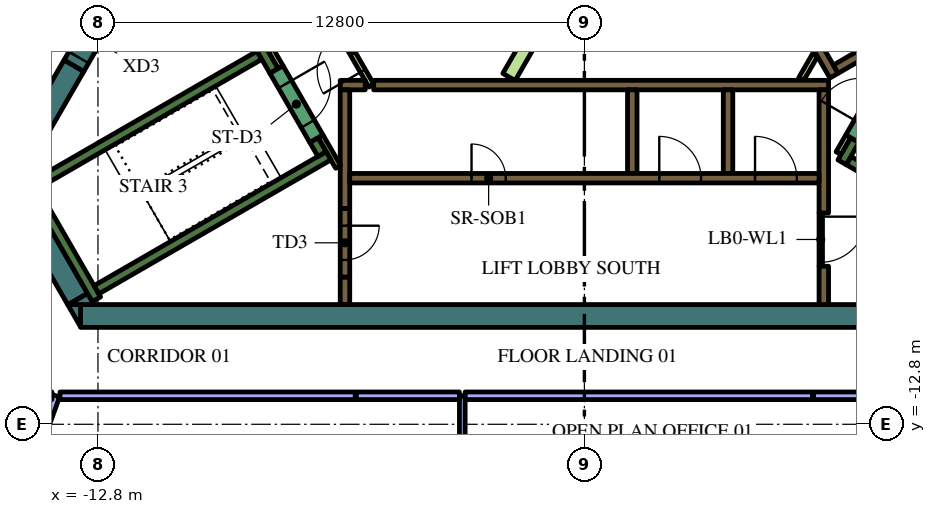
"""IFC4 building model, lengths in metres.
Left out: names, types, materials, properties, quantities, classifications, styles, units other than length and angle.
Written with IfcOpenShell. Run it as: python <this file> out.ifc"""

import sys

from ifc_helpers import new_model, si_unit, direction, frame, frame_2d, origin, place, context, subcontext, project, spatial, polyline, rectangle, outline, extrude, element, fill, save


model = new_model("IFC4")
c1 = context("Model", 3, precision=1e-05, world=origin(), true_north=direction((0.0, 1.0)))
c2 = subcontext(c1, "Body", "Model", "MODEL_VIEW")
j1 = project(units=[si_unit("LENGTHUNIT", "METRE"), si_unit("PLANEANGLEUNIT", "RADIAN")], contexts=[c1])
p1 = place(None, origin())
s1 = spatial("IfcSite", under=j1, at=p1, CompositionType="ELEMENT")
p2 = place(p1, origin())
s2 = spatial("IfcBuilding", under=s1, at=p2, CompositionType="ELEMENT")
p3 = place(p2, frame((0.0, 0.0, 267.0)))
s3 = spatial("IfcBuildingStorey", under=s2, at=p3, CompositionType="ELEMENT", Elevation=267.0)
p4 = place(p3, frame((8.904, -9.95, 0.0), z_axis=(0.0, 0.0, 1.0), x_axis=(-1.0, 0.0, 0.0)))
e1 = element("IfcWall", 1, at=p4, inside=s3, PredefinedType="SOLIDWALL", context=c2, shape_type="SweptSolid", body=[
    extrude(rectangle(XDim=22.161, YDim=0.6, at=frame_2d((11.081, 0.0))), origin(), (0.0, 0.0, 1.0), 4.2),
])
p5 = place(p3, origin())
e2 = element("IfcWall", 2, at=p5, inside=s3, PredefinedType="SOLIDWALL", context=c2, shape_type="SweptSolid", body=[
    extrude(outline(polyline([(-13.597, -9.65), (-13.259, -9.65), (-13.259, -10.236), (-13.597, -9.65)])), origin(), (0.0, 0.0, 1.0), 4.2),
])
p6 = place(p3, frame((-13.333, -9.506, 0.0), z_axis=(0.0, 0.0, 1.0), x_axis=(-0.500019073792, 0.866014391245, 0.0)))
e3 = element("IfcWall", 3, at=p6, inside=s3, PredefinedType="SOLIDWALL", context=c2, shape_type="SweptSolid", body=[
    extrude(rectangle(XDim=3.823, YDim=0.6, at=frame_2d((1.912, 0.0))), origin(), (0.0, 0.0, 1.0), 4.2),
])
e4 = element("IfcWall", 4, at=p5, inside=s3, PredefinedType="SOLIDWALL", context=c2, shape_type="SweptSolid", body=[
    extrude(outline(polyline([(-12.904, -9.65), (-13.58, -9.65), (-13.073, -9.357), (-12.904, -9.65)])), origin(), (0.0, 0.0, 1.0), 4.2),
])
p7 = place(p3, frame((-13.432, -3.364, 0.0), z_axis=(0.0, 0.0, 1.0), x_axis=(-0.499960127962, -0.866048422692, 0.0)))
e5 = element("IfcWall", 5, at=p7, inside=s3, PredefinedType="SOLIDWALL", context=c2, shape_type="SweptSolid", body=[
    extrude(rectangle(XDim=2.934, YDim=0.6, at=frame_2d((1.467, 0.0))), origin(), (0.0, 0.0, 1.0), 4.2),
])
p8 = place(p3, frame((12.84, -9.261, 0.0), z_axis=(0.0, 0.0, 1.0), x_axis=(-0.866013990052, 0.500019768644, 0.0)))
e6 = element("IfcWall", 6, at=p8, inside=s3, PredefinedType="SOLIDWALL", context=c2, shape_type="SweptSolid", body=[
    extrude(rectangle(XDim=6.8, YDim=0.25, at=frame_2d((3.4, 0.0))), origin(), (0.0, 0.0, 1.0), 4.2),
])
p9 = place(p3, frame((6.78, -5.906, 0.0), z_axis=(0.0, 0.0, 1.0), x_axis=(0.500223362819, 0.865896406789, 0.0)))
e7 = element("IfcWall", 7, at=p9, inside=s3, PredefinedType="SOLIDWALL", context=c2, shape_type="SweptSolid", body=[
    extrude(rectangle(XDim=0.675, YDim=0.25, at=frame_2d((0.337, 0.0))), origin(), (0.0, 0.0, 1.0), 4.2),
])
p10 = place(p3, frame((-12.84, -9.511, 0.0), z_axis=(0.0, 0.0, 1.0), x_axis=(-0.499997733992, 0.866026712061, 0.0)))
e8 = element("IfcWall", 8, at=p10, inside=s3, PredefinedType="SOLIDWALL", context=c2, shape_type="SweptSolid", body=[
    extrude(rectangle(XDim=3.634, YDim=0.25, at=frame_2d((1.817, 0.0))), origin(), (0.0, 0.0, 1.0), 4.2),
])
p11 = place(p3, frame((-14.44, -6.49, 0.0), z_axis=(0.0, 0.0, 1.0), x_axis=(0.866022966069, 0.500004222222, 0.0)))
e9 = element("IfcWall", 9, at=p11, inside=s3, PredefinedType="SOLIDWALL", context=c2, shape_type="SweptSolid", body=[
    extrude(rectangle(XDim=6.8, YDim=0.25, at=frame_2d((3.4, 0.0))), origin(), (0.0, 0.0, 1.0), 4.2),
])
p12 = place(p3, frame((-8.168, -3.503, 0.0), z_axis=(0.0, 0.0, 1.0), x_axis=(-0.499952099219, 0.866053057547, 0.0)))
e10 = element("IfcWall", 10, at=p12, inside=s3, PredefinedType="SOLIDWALL", context=c2, shape_type="SweptSolid", body=[
    extrude(rectangle(XDim=0.675, YDim=0.25, at=frame_2d((0.337, 0.0))), origin(), (0.0, 0.0, 1.0), 4.2),
])
p13 = place(p3, frame((-12.84, -9.261, 0.0), z_axis=(0.0, 0.0, 1.0), x_axis=(0.866016039709, 0.500016218704, 0.0)))
e11 = element("IfcWall", 11, at=p13, inside=s3, PredefinedType="SOLIDWALL", context=c2, shape_type="SweptSolid", body=[
    extrude(rectangle(XDim=7.05, YDim=0.25, at=frame_2d((3.525, 0.0))), origin(), (0.0, 0.0, 1.0), 4.2),
])
p14 = place(p3, frame((-6.905, -5.69, 0.0), z_axis=(0.0, 0.0, 1.0), x_axis=(-0.500402024738, 0.865793170242, 0.0)))
e12 = element("IfcWall", 12, at=p14, inside=s3, PredefinedType="SOLIDWALL", context=c2, shape_type="SweptSolid", body=[
    extrude(rectangle(XDim=0.425, YDim=0.25, at=frame_2d((0.212, 0.0))), origin(), (0.0, 0.0, 1.0), 4.2),
])
p15 = place(p3, frame((-5.545, -3.875, 0.0), z_axis=(0.0, 0.0, 1.0), x_axis=(1.0, 0.0, 0.0)))
e13 = element("IfcWall", 13, at=p15, inside=s3, PredefinedType="SOLIDWALL", context=c2, shape_type="SweptSolid", body=[
    extrude(rectangle(XDim=11.97, YDim=0.25, at=frame_2d((5.985, 0.0))), origin(), (0.0, 0.0, 1.0), 4.2),
])
p16 = place(p3, frame((-6.425, -3.875, 0.0), z_axis=(0.0, 0.0, 1.0), x_axis=(1.0, 0.0, 0.0)))
e14 = element("IfcWall", 14, at=p16, inside=s3, PredefinedType="SOLIDWALL", context=c2, shape_type="SweptSolid", body=[
    extrude(rectangle(XDim=0.658, YDim=0.25, at=frame_2d((0.329, 0.0))), origin(), (0.0, 0.0, 1.0), 4.2),
])
p17 = place(p3, frame((6.3, -7.24, 0.0), z_axis=(0.0, 0.0, 1.0), x_axis=(0.0, 1.0, 0.0)))
e15 = element("IfcWall", 15, at=p17, inside=s3, PredefinedType="SOLIDWALL", context=c2, shape_type="SweptSolid", body=[
    extrude(rectangle(XDim=3.24, YDim=0.25, at=frame_2d((1.62, 0.0))), origin(), (0.0, 0.0, 1.0), 4.2),
])
p18 = place(p3, frame((6.3, -9.65, 0.0), z_axis=(0.0, 0.0, 1.0), x_axis=(0.0, 1.0, 0.0)))
e16 = element("IfcWall", 16, at=p18, inside=s3, PredefinedType="SOLIDWALL", context=c2, shape_type="SweptSolid", body=[
    extrude(rectangle(XDim=1.008, YDim=0.25, at=frame_2d((0.504, 0.0))), origin(), (0.0, 0.0, 1.0), 4.2),
])
for number, where, z_axis, x_axis in (
    (17, (3.78, -4.0, 0.0), (0.0, 0.0, 1.0), (0.0, -1.0, 0.0)),
    (18, (1.26, -4.0, 0.0), (0.0, 0.0, 1.0), (0.0, -1.0, 0.0)),
):
    element("IfcWall", number, at=place(p3, frame(where, z_axis=z_axis, x_axis=x_axis)), inside=s3, PredefinedType="SOLIDWALL", context=c2, shape_type="SweptSolid", body=[
        extrude(rectangle(XDim=2.2, YDim=0.25, at=frame_2d((1.1, 0.0))), origin(), (0.0, 0.0, 1.0), 4.2),
    ])
p19 = place(p3, frame((-6.3, -7.125, 0.0), z_axis=(0.0, 0.0, 1.0), x_axis=(0.0, 1.0, 0.0)))
e19 = element("IfcWall", 19, at=p19, inside=s3, PredefinedType="SOLIDWALL", context=c2, shape_type="SweptSolid", body=[
    extrude(rectangle(XDim=3.125, YDim=0.25, at=frame_2d((1.562, 0.0))), origin(), (0.0, 0.0, 1.0), 4.2),
])
p20 = place(p3, frame((-6.3, -8.925, 0.0), z_axis=(0.0, 0.0, 1.0), x_axis=(0.0, -1.0, 0.0)))
e20 = element("IfcWall", 20, at=p20, inside=s3, PredefinedType="SOLIDWALL", context=c2, shape_type="SweptSolid", body=[
    extrude(rectangle(XDim=0.725, YDim=0.25, at=frame_2d((0.363, 0.0))), origin(), (0.0, 0.0, 1.0), 4.2),
])
p21 = place(p3, frame((6.568, -3.627, 0.0), z_axis=(0.0, 0.0, 1.0), x_axis=(-0.499999455981, 0.866025717874, 0.0)))
e21 = element("IfcWall", 21, at=p21, inside=s3, PredefinedType="SOLIDWALL", context=c2, shape_type="SweptSolid", body=[
    extrude(rectangle(XDim=11.978, YDim=0.25, at=frame_2d((5.989, 0.0))), origin(), (0.0, 0.0, 1.0), 4.2),
])
p22 = place(p3, frame((6.614, -3.456, 0.0), z_axis=(0.0, 0.0, 1.0), x_axis=(0.866032512851, 0.499987686533, 0.0)))
e22 = element("IfcWall", 22, at=p22, inside=s3, PredefinedType="SOLIDWALL", context=c2, shape_type="SweptSolid", body=[
    extrude(rectangle(XDim=2.975, YDim=0.25, at=frame_2d((1.487, 0.0))), origin(), (0.0, 0.0, 1.0), 4.2),
])
p23 = place(p3, frame((-8.252, -2.958, 0.0), z_axis=(0.0, 0.0, 1.0), x_axis=(0.500174715838, -0.865924508047, 0.0)))
e23 = element("IfcWall", 23, at=p23, inside=s3, PredefinedType="PARTITIONING", context=c2, shape_type="SweptSolid", body=[
    extrude(rectangle(XDim=0.514, YDim=0.15, at=frame_2d((0.257, 0.0))), origin(), (0.0, 0.0, 1.0), 3.55),
])
p24 = place(p3, frame((-6.48, -6.027, 0.0), z_axis=(0.0, 0.0, 1.0), x_axis=(-0.499927229454, 0.866067413802, 0.0)))
e24 = element("IfcWall", 24, at=p24, inside=s3, PredefinedType="PARTITIONING", context=c2, shape_type="SweptSolid", body=[
    extrude(rectangle(XDim=0.929, YDim=0.15, at=frame_2d((0.464, 0.0))), origin(), (0.0, 0.0, 1.0), 4.2),
])
p25 = place(p3, frame((6.945, -5.222, 0.0), z_axis=(0.0, 0.0, 1.0), x_axis=(-0.499818422106, -0.866130212453, 0.0)))
e25 = element("IfcWall", 25, at=p25, inside=s3, PredefinedType="PARTITIONING", context=c2, shape_type="SweptSolid", body=[
    extrude(rectangle(XDim=0.514, YDim=0.15, at=frame_2d((0.257, 0.0))), origin(), (0.0, 0.0, 1.0), 3.55),
])
p26 = place(p3, frame((5.705, -3.718, 0.0), z_axis=(0.0, 0.0, 1.0), x_axis=(0.499962090823, 0.866047289552, 0.0)))
e26 = element("IfcWall", 26, at=p26, inside=s3, PredefinedType="PARTITIONING", context=c2, shape_type="SweptSolid", body=[
    extrude(rectangle(XDim=0.735, YDim=0.15, at=frame_2d((0.367, 0.0))), origin(), (0.0, 0.0, 1.0), 3.55),
])
e27 = element("IfcWall", 27, at=p5, inside=s3, PredefinedType="PARTITIONING", context=c2, shape_type="SweptSolid", body=[
    extrude(outline(polyline([(-0.59, -0.872), (-0.265, -1.059), (-1.822, -3.756), (-2.147, -3.568), (-0.59, -0.872)])), origin(), (0.0, 0.0, 1.0), 3.55),
])
p27 = place(p3, frame((-6.175, -6.325, 0.0), z_axis=(0.0, 0.0, 1.0), x_axis=(1.0, 0.0, 0.0)))
e28 = element("IfcWall", 28, at=p27, inside=s3, PredefinedType="SOLIDWALL", context=c2, shape_type="SweptSolid", body=[
    extrude(rectangle(XDim=12.35, YDim=0.25, at=frame_2d((6.175, 0.0))), origin(), (0.0, 0.0, 1.0), 4.2),
])
p28 = place(p27, frame((3.205, 0.0, 0.0)))
e29 = element("IfcOpeningElement", 29, at=p28, cuts=e28, PredefinedType="OPENING", context=c2, shape_type="SweptSolid", body=[
    extrude(rectangle(XDim=0.9, YDim=2.1, at=frame_2d((0.45, 1.05))), frame((0.0, 0.135, 0.0), z_axis=(0.0, -1.0, 0.0), x_axis=(1.0, 0.0, 0.0)), (0.0, 0.0, 1.0), 0.27),
])
p29 = place(p27, frame((8.145, 0.0, 0.0)))
e30 = element("IfcOpeningElement", 30, at=p29, cuts=e28, PredefinedType="OPENING", context=c2, shape_type="SweptSolid", body=[
    extrude(rectangle(XDim=1.1, YDim=2.1, at=frame_2d((0.55, 1.05))), frame((0.0, 0.135, 0.0), z_axis=(0.0, -1.0, 0.0), x_axis=(1.0, 0.0, 0.0)), (0.0, 0.0, 1.0), 0.27),
])
p30 = place(p27, frame((10.665, 0.0, 0.0)))
e31 = element("IfcOpeningElement", 31, at=p30, cuts=e28, PredefinedType="OPENING", context=c2, shape_type="SweptSolid", body=[
    extrude(rectangle(XDim=1.1, YDim=2.1, at=frame_2d((0.55, 1.05))), frame((0.0, 0.135, 0.0), z_axis=(0.0, -1.0, 0.0), x_axis=(1.0, 0.0, 0.0)), (0.0, 0.0, 1.0), 0.27),
])
p31 = place(p3, frame((7.053, -5.284, 0.0), z_axis=(0.0, 0.0, 1.0), x_axis=(0.500078061341, 0.865980330357, 0.0)))
e32 = element("IfcWall", 32, at=p31, inside=s3, PredefinedType="SOLIDWALL", context=c2, shape_type="SweptSolid", body=[
    extrude(rectangle(XDim=2.1, YDim=0.4, at=frame_2d((1.05, 0.0))), origin(), (0.0, 0.0, 1.0), 4.2),
])
p32 = place(p31, frame((0.45, 0.0, 0.0)))
e33 = element("IfcOpeningElement", 33, at=p32, cuts=e32, PredefinedType="OPENING", context=c2, shape_type="SweptSolid", body=[
    extrude(rectangle(XDim=1.2, YDim=2.1, at=frame_2d((0.6, 1.05))), frame((0.0, 0.21, 0.0), z_axis=(0.0, -1.0, 0.0), x_axis=(1.0, 0.0, 0.0)), (0.0, 0.0, 1.0), 0.42),
])
p33 = place(p3, frame((-8.103, -3.466, 0.0), z_axis=(0.0, 0.0, 1.0), x_axis=(0.500078061341, -0.865980330357, 0.0)))
e34 = element("IfcWall", 34, at=p33, inside=s3, PredefinedType="SOLIDWALL", context=c2, shape_type="SweptSolid", body=[
    extrude(rectangle(XDim=2.1, YDim=0.4, at=frame_2d((1.05, 0.0))), origin(), (0.0, 0.0, 1.0), 4.2),
])
p34 = place(p33, frame((0.45, 0.0, 0.0)))
e35 = element("IfcOpeningElement", 35, at=p34, cuts=e34, PredefinedType="OPENING", context=c2, shape_type="SweptSolid", body=[
    extrude(rectangle(XDim=1.2, YDim=2.1, at=frame_2d((0.6, 1.05))), frame((0.0, 0.21, 0.0), z_axis=(0.0, -1.0, 0.0), x_axis=(1.0, 0.0, 0.0)), (0.0, 0.0, 1.0), 0.42),
])
p35 = place(p3, frame((-6.3, -7.125, 0.0), z_axis=(0.0, 0.0, 1.0), x_axis=(0.0, -1.0, 0.0)))
e36 = element("IfcWall", 36, at=p35, inside=s3, PredefinedType="SOLIDWALL", context=c2, shape_type="SweptSolid", body=[
    extrude(rectangle(XDim=1.8, YDim=0.25, at=frame_2d((0.9, 0.0))), origin(), (0.0, 0.0, 1.0), 4.2),
])
p36 = place(p35, frame((0.45, 0.0, 0.0)))
e37 = element("IfcOpeningElement", 37, at=p36, cuts=e36, PredefinedType="OPENING", context=c2, shape_type="SweptSolid", body=[
    extrude(rectangle(XDim=0.9, YDim=2.1, at=frame_2d((0.45, 1.05))), frame((0.0, 0.135, 0.0), z_axis=(0.0, -1.0, 0.0), x_axis=(1.0, 0.0, 0.0)), (0.0, 0.0, 1.0), 0.27),
])
p37 = place(p3, frame((-5.606, -3.89, 0.0), z_axis=(0.0, 0.0, 1.0), x_axis=(-0.500027713859, 0.866009402589, 0.0)))
e38 = element("IfcWall", 38, at=p37, inside=s3, PredefinedType="PARTITIONING", context=c2, shape_type="SweptSolid", body=[
    extrude(rectangle(XDim=2.1, YDim=0.15, at=frame_2d((1.05, 0.0))), origin(), (0.0, 0.0, 1.0), 3.55),
])
p38 = place(p37, frame((0.45, 0.0, 0.0)))
e39 = element("IfcOpeningElement", 39, at=p38, cuts=e38, PredefinedType="OPENING", context=c2, shape_type="SweptSolid", body=[
    extrude(rectangle(XDim=1.2, YDim=2.1, at=frame_2d((0.6, 1.05))), frame((0.0, 0.085, 0.0), z_axis=(0.0, -1.0, 0.0), x_axis=(1.0, 0.0, 0.0)), (0.0, 0.0, 1.0), 0.17),
])
p39 = place(p3, frame((6.22, -7.237, 0.0), z_axis=(0.0, 0.0, 1.0), x_axis=(0.0, -1.0, 0.0)))
e40 = element("IfcWall", 40, at=p39, inside=s3, PredefinedType="PARTITIONING", context=c2, shape_type="SweptSolid", body=[
    extrude(rectangle(XDim=1.4, YDim=0.09, at=frame_2d((0.7, 0.0))), origin(), (0.0, 0.0, 1.0), 3.55),
])
p40 = place(p39, frame((0.1, 0.0, 0.0)))
e41 = element("IfcOpeningElement", 41, at=p40, cuts=e40, PredefinedType="OPENING", context=c2, shape_type="SweptSolid", body=[
    extrude(rectangle(XDim=1.2, YDim=2.1, at=frame_2d((0.6, 1.05))), frame((0.0, 0.055, 0.0), z_axis=(0.0, -1.0, 0.0), x_axis=(1.0, 0.0, 0.0)), (0.0, 0.0, 1.0), 0.11),
])
p41 = place(p3, frame((-13.432, -3.364, 0.0), z_axis=(0.0, 0.0, 1.0), x_axis=(0.500000056704, 0.866025371046, 0.0)))
e42 = element("IfcWall", 42, at=p41, inside=s3, PredefinedType="SOLIDWALL", context=c2, shape_type="SweptSolid", body=[
    extrude(rectangle(XDim=1.7, YDim=0.6, at=frame_2d((0.85, 0.0))), origin(), (0.0, 0.0, 1.0), 4.2),
])
p42 = place(p41, frame((0.25, 0.0, 0.0)))
e43 = element("IfcOpeningElement", 43, at=p42, cuts=e42, PredefinedType="OPENING", context=c2, shape_type="SweptSolid", body=[
    extrude(rectangle(XDim=1.2, YDim=2.1, at=frame_2d((0.6, 1.05))), frame((0.0, 0.31, 0.0), z_axis=(0.0, -1.0, 0.0), x_axis=(1.0, 0.0, 0.0)), (0.0, 0.0, 1.0), 0.62),
])
p43 = place(p3, frame((-3.213, -15.212, 0.0), z_axis=(0.0, 0.0, 1.0), x_axis=(0.0, 1.0, 0.0)))
e44 = element("IfcWall", 44, at=p43, inside=s3, PredefinedType="PARTITIONING", context=c2, shape_type="SweptSolid", body=[
    extrude(rectangle(XDim=3.162, YDim=0.15, at=frame_2d((1.581, 0.0))), origin(), (0.0, 0.0, 1.0), 3.55),
])
p44 = place(p43, frame((1.162, 0.0, 0.0)))
e45 = element("IfcOpeningElement", 45, at=p44, cuts=e44, PredefinedType="OPENING", context=c2, shape_type="SweptSolid", body=[
    extrude(rectangle(XDim=0.9, YDim=2.1, at=frame_2d((0.45, 1.05))), frame((0.0, 0.085, 0.0), z_axis=(0.0, -1.0, 0.0), x_axis=(1.0, 0.0, 0.0)), (0.0, 0.0, 1.0), 0.17),
])
p45 = place(p3, frame((-15.774, -17.19, 0.0), z_axis=(0.0, 0.0, 1.0), x_axis=(0.341821907823, 0.93976474893, 0.0)))
e46 = element("IfcWall", 46, at=p45, inside=s3, PredefinedType="PARTITIONING", context=c2, shape_type="SweptSolid", body=[
    extrude(rectangle(XDim=5.469, YDim=0.2, at=frame_2d((2.735, 0.0))), origin(), (0.0, 0.0, 1.0), 3.55),
])
p46 = place(p3, frame((-6.0, -12.05, 0.0), z_axis=(0.0, 0.0, 1.0), x_axis=(1.0, 0.0, 0.0)))
e47 = element("IfcWall", 47, at=p46, inside=s3, PredefinedType="PARTITIONING", context=c2, shape_type="SweptSolid", body=[
    extrude(rectangle(XDim=2.712, YDim=0.2, at=frame_2d((1.356, 0.0))), origin(), (0.0, 0.0, 1.0), 3.55),
])
p47 = place(p3, frame((-13.799, -12.05, 0.0), z_axis=(0.0, 0.0, 1.0), x_axis=(1.0, 0.0, 0.0)))
e48 = element("IfcWall", 48, at=p47, inside=s3, PredefinedType="PARTITIONING", context=c2, shape_type="SweptSolid", body=[
    extrude(rectangle(XDim=7.769, YDim=0.2, at=frame_2d((3.884, 0.0))), origin(), (0.0, 0.0, 1.0), 3.55),
])
p48 = place(p3, frame((-3.138, -12.05, 0.0), z_axis=(0.0, 0.0, 1.0), x_axis=(1.0, 0.0, 0.0)))
e49 = element("IfcWall", 49, at=p48, inside=s3, PredefinedType="PARTITIONING", context=c2, shape_type="SweptSolid", body=[
    extrude(rectangle(XDim=9.138, YDim=0.2, at=frame_2d((4.569, 0.0))), origin(), (0.0, 0.0, 1.0), 3.55),
])
p49 = place(p3, frame((6.03, -12.05, 0.0), z_axis=(0.0, 0.0, 1.0), x_axis=(1.0, 0.0, 0.0)))
e50 = element("IfcWall", 50, at=p49, inside=s3, PredefinedType="PARTITIONING", context=c2, shape_type="SweptSolid", body=[
    extrude(rectangle(XDim=8.259, YDim=0.2, at=frame_2d((4.13, 0.0))), origin(), (0.0, 0.0, 1.0), 3.55),
])
p50 = place(p3, frame((-13.451, 0.803, 0.0), z_axis=(0.0, 0.0, 1.0), x_axis=(-0.499982585408, -0.86603545787, 0.0)))
e51 = element("IfcWall", 51, at=p50, inside=s3, PredefinedType="PARTITIONING", context=c2, shape_type="SweptSolid", body=[
    extrude(rectangle(XDim=8.26, YDim=0.2, at=frame_2d((4.13, 0.0))), origin(), (0.0, 0.0, 1.0), 3.55),
])
p51 = place(p28, origin())
e52 = element("IfcDoor", 52, at=p51, inside=s3, OperationType="SINGLE_SWING_LEFT", PredefinedType="DOOR", context=c2, shape_type="SweptSolid", body=[
    extrude(rectangle(XDim=0.9, YDim=2.1, at=frame_2d((0.45, 1.05))), frame((0.0, 0.025, 0.0), z_axis=(0.0, -1.0, 0.0), x_axis=(1.0, 0.0, 0.0)), (0.0, 0.0, 1.0), 0.05),
])
fill(e29, e52)
p52 = place(p29, origin())
e53 = element("IfcDoor", 53, at=p52, inside=s3, OperationType="DOUBLE_DOOR_SLIDING", PredefinedType="DOOR", context=c2, shape_type="SweptSolid", body=[
    extrude(rectangle(XDim=1.1, YDim=2.1, at=frame_2d((0.55, 1.05))), frame((0.0, 0.025, 0.0), z_axis=(0.0, -1.0, 0.0), x_axis=(1.0, 0.0, 0.0)), (0.0, 0.0, 1.0), 0.05),
])
fill(e30, e53)
p53 = place(p30, origin())
e54 = element("IfcDoor", 54, at=p53, inside=s3, OperationType="DOUBLE_DOOR_SLIDING", PredefinedType="DOOR", context=c2, shape_type="SweptSolid", body=[
    extrude(rectangle(XDim=1.1, YDim=2.1, at=frame_2d((0.55, 1.05))), frame((0.0, 0.025, 0.0), z_axis=(0.0, -1.0, 0.0), x_axis=(1.0, 0.0, 0.0)), (0.0, 0.0, 1.0), 0.05),
])
fill(e31, e54)
p54 = place(p34, origin())
e55 = element("IfcDoor", 55, at=p54, inside=s3, OperationType="SINGLE_SWING_LEFT", PredefinedType="DOOR", context=c2, shape_type="SweptSolid", body=[
    extrude(rectangle(XDim=1.2, YDim=2.1, at=frame_2d((0.6, 1.05))), frame((0.0, 0.025, 0.0), z_axis=(0.0, -1.0, 0.0), x_axis=(1.0, 0.0, 0.0)), (0.0, 0.0, 1.0), 0.05),
])
fill(e35, e55)
p55 = place(p36, origin())
e56 = element("IfcDoor", 56, at=p55, inside=s3, OperationType="SINGLE_SWING_LEFT", PredefinedType="DOOR", context=c2, shape_type="SweptSolid", body=[
    extrude(rectangle(XDim=0.9, YDim=2.1, at=frame_2d((0.45, 1.05))), frame((0.0, 0.025, 0.0), z_axis=(0.0, -1.0, 0.0), x_axis=(1.0, 0.0, 0.0)), (0.0, 0.0, 1.0), 0.05),
])
fill(e37, e56)
p56 = place(p38, origin())
e57 = element("IfcDoor", 57, at=p56, inside=s3, OperationType="SINGLE_SWING_LEFT", PredefinedType="DOOR", context=c2, shape_type="SweptSolid", body=[
    extrude(rectangle(XDim=1.2, YDim=2.1, at=frame_2d((0.6, 1.05))), frame((0.0, 0.025, 0.0), z_axis=(0.0, -1.0, 0.0), x_axis=(1.0, 0.0, 0.0)), (0.0, 0.0, 1.0), 0.05),
])
fill(e39, e57)
p57 = place(p40, origin())
e58 = element("IfcDoor", 58, at=p57, inside=s3, OperationType="SINGLE_SWING_LEFT", PredefinedType="DOOR", context=c2, shape_type="SweptSolid", body=[
    extrude(rectangle(XDim=1.2, YDim=2.1, at=frame_2d((0.6, 1.05))), frame((0.0, 0.025, 0.0), z_axis=(0.0, -1.0, 0.0), x_axis=(1.0, 0.0, 0.0)), (0.0, 0.0, 1.0), 0.05),
])
fill(e41, e58)
p58 = place(p42, origin())
e59 = element("IfcDoor", 59, at=p58, inside=s3, OperationType="SINGLE_SWING_LEFT", PredefinedType="DOOR", context=c2, shape_type="SweptSolid", body=[
    extrude(rectangle(XDim=1.2, YDim=2.1, at=frame_2d((0.6, 1.05))), frame((0.0, 0.025, 0.0), z_axis=(0.0, -1.0, 0.0), x_axis=(1.0, 0.0, 0.0)), (0.0, 0.0, 1.0), 0.05),
])
fill(e43, e59)
save(model, sys.argv[1])
